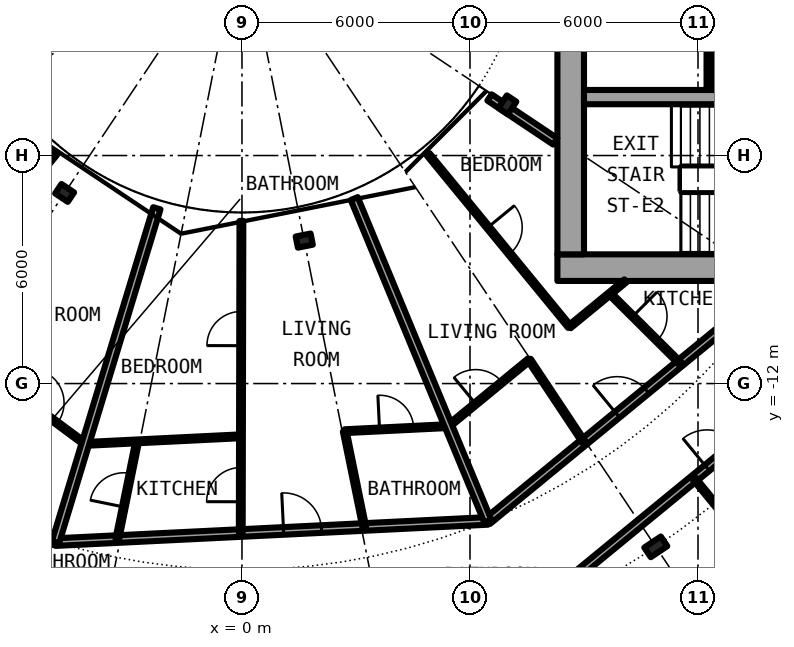
"""IFC4 building model, lengths in metres.
Left out: names, types, materials, properties, quantities, classifications, styles, units other than length and angle.
Written with IfcOpenShell. Run it as: python <this file> out.ifc"""

import sys

from ifc_helpers import new_model, si_unit, direction, frame, frame_2d, origin, origin_2d, place, context, subcontext, project, spatial, rectangle, i_section, extrude, element, fill, save


model = new_model("IFC4")
c1 = context("Model", 3, precision=1e-05, world=origin(), true_north=direction((0.0, 1.0)))
c2 = subcontext(c1, "Body", "Model", "MODEL_VIEW")
j1 = project(units=[si_unit("LENGTHUNIT", "METRE"), si_unit("PLANEANGLEUNIT", "RADIAN")], contexts=[c1])
p1 = place(None, origin())
s1 = spatial("IfcSite", under=j1, at=p1, CompositionType="ELEMENT")
p2 = place(p1, origin())
s2 = spatial("IfcBuilding", under=s1, at=p2, CompositionType="ELEMENT")
p3 = place(p2, frame((0.0, 0.0, 63.6)))
s3 = spatial("IfcBuildingStorey", under=s2, at=p3, CompositionType="ELEMENT", Elevation=63.6)
p4 = place(p3, frame((10.889, -16.297, 0.0), z_axis=(0.0, 0.0, 1.0), x_axis=(0.55557023302, -0.831469612303, 0.0)))
e1 = element("IfcColumn", 1, at=p4, inside=s3, PredefinedType="COLUMN", context=c2, shape_type="SweptSolid", body=[
    extrude(i_section(OverallWidth=0.306, OverallDepth=0.524, WebThickness=0.021, FlangeThickness=0.04, FilletRadius=0.027, at=origin_2d()), origin(), (0.0, 0.0, 1.0), 3.05),
])
for number, where, z_axis, x_axis in (
    (2, (-4.667, -6.984, 0.0), (0.0, 0.0, 1.0), (-0.556, -0.831, 0.0)),
    (3, (1.639, -8.239, 0.0), (0.0, 0.0, 1.0), (0.195, -0.981, 0.0)),
    (4, (6.984, -4.667, 0.0), (0.0, 0.0, 1.0), (0.831, -0.556, 0.0)),
):
    element("IfcColumn", number, at=place(p3, frame(where, z_axis=z_axis, x_axis=x_axis)), inside=s3, PredefinedType="COLUMN", context=c2, shape_type="SweptSolid", body=[
        extrude(i_section(OverallWidth=0.3, OverallDepth=0.4, WebThickness=0.013, FlangeThickness=0.024, FilletRadius=0.027, at=origin_2d()), origin(), (0.0, 0.0, 1.0), 3.05),
    ])
p5 = place(p3, frame((8.3, -8.95, 0.0), z_axis=(0.0, 0.0, 1.0), x_axis=(1.0, 0.0, 0.0)))
e5 = element("IfcWall", 5, at=p5, inside=s3, PredefinedType="SHEAR", context=c2, shape_type="SweptSolid", body=[
    extrude(rectangle(XDim=14.0, YDim=0.7, at=frame_2d((7.0, 0.0))), origin(), (0.0, 0.0, 1.0), 3.05),
])
p6 = place(p5, frame((11.575, 0.0, 0.0)))
e6 = element("IfcOpeningElement", 6, at=p6, cuts=e5, PredefinedType="OPENING", context=c2, shape_type="SweptSolid", body=[
    extrude(rectangle(XDim=1.2, YDim=2.3, at=frame_2d((0.6, 1.15))), frame((0.0, 0.36, 0.0), z_axis=(0.0, -1.0, 0.0), x_axis=(1.0, 0.0, 0.0)), (0.0, 0.0, 1.0), 0.72),
])
p7 = place(p3, frame((8.65, -8.6, 0.0), z_axis=(0.0, 0.0, 1.0), x_axis=(0.0, 1.0, 0.0)))
e7 = element("IfcWall", 7, at=p7, inside=s3, PredefinedType="SHEAR", context=c2, shape_type="SweptSolid", body=[
    extrude(rectangle(XDim=17.2, YDim=0.7, at=frame_2d((8.6, 0.0))), origin(), (0.0, 0.0, 1.0), 3.05),
])
p8 = place(p7, frame((7.4, 0.0, 0.1)))
e8 = element("IfcOpeningElement", 8, at=p8, cuts=e7, PredefinedType="OPENING", context=c2, shape_type="SweptSolid", body=[
    extrude(rectangle(XDim=2.4, YDim=2.2, at=frame_2d((1.2, 1.1))), frame((0.0, 0.36, 0.0), z_axis=(0.0, -1.0, 0.0), x_axis=(1.0, 0.0, 0.0)), (0.0, 0.0, 1.0), 0.72),
])
p9 = place(p3, frame((9.0, -4.462, 0.0), z_axis=(0.0, 0.0, 1.0), x_axis=(1.0, 0.0, 0.0)))
e9 = element("IfcWall", 9, at=p9, inside=s3, PredefinedType="SHEAR", context=c2, shape_type="SweptSolid", body=[
    extrude(rectangle(XDim=10.15, YDim=0.375, at=frame_2d((5.075, 0.0))), origin(), (0.0, 0.0, 1.0), 3.05),
])
p10 = place(p3, frame((12.3, -1.825, 0.0), z_axis=(0.0, 0.0, 1.0), x_axis=(0.0, -1.0, 0.0)))
e10 = element("IfcWall", 10, at=p10, inside=s3, PredefinedType="PARTITIONING", context=c2, shape_type="SweptSolid", body=[
    extrude(rectangle(XDim=2.45, YDim=0.15, at=frame_2d((1.225, 0.0))), origin(), (0.0, 0.0, 1.0), 2.7),
])
p11 = place(p3, frame((8.534, -20.603, 0.0), z_axis=(0.0, 0.0, 1.0), x_axis=(0.773000340237, 0.634405606843, 0.0)))
e11 = element("IfcWall", 11, at=p11, inside=s3, PredefinedType="PARTITIONING", context=c2, shape_type="SweptSolid", body=[
    extrude(rectangle(XDim=6.474, YDim=0.1, at=frame_2d((3.237, 0.0))), origin(), (0.0, 0.0, 1.0), 2.7),
])
p12 = place(p3, frame((-10.745, -16.356, 0.0), z_axis=(0.0, 0.0, 1.0), x_axis=(0.923881347896, -0.382679049609, 0.0)))
e12 = element("IfcWall", 12, at=p12, inside=s3, PredefinedType="PARTITIONING", context=c2, shape_type="SweptSolid", body=[
    extrude(rectangle(XDim=7.335, YDim=0.2, at=frame_2d((3.668, 0.0))), origin(), (0.0, 0.0, 1.0), 2.38),
])
p13 = place(p12, frame((4.124, 0.0, 0.0)))
e13 = element("IfcOpeningElement", 13, at=p13, cuts=e12, PredefinedType="OPENING", context=c2, shape_type="SweptSolid", body=[
    extrude(rectangle(XDim=1.0, YDim=2.3, at=frame_2d((0.5, 1.15))), frame((0.0, 0.11, 0.0), z_axis=(0.0, -1.0, 0.0), x_axis=(1.0, 0.0, 0.0)), (0.0, 0.0, 1.0), 0.22),
])
p14 = place(p3, frame((7.498, -18.109, 0.0), z_axis=(0.0, 0.0, 1.0), x_axis=(0.773076379635, 0.634312944256, 0.0)))
e14 = element("IfcWall", 14, at=p14, inside=s3, PredefinedType="PARTITIONING", context=c2, shape_type="SweptSolid", body=[
    extrude(rectangle(XDim=11.221, YDim=0.2, at=frame_2d((5.611, 0.0))), origin(), (0.0, 0.0, 1.0), 2.38),
])
p15 = place(p14, frame((6.132, 0.0, 0.0)))
e15 = element("IfcOpeningElement", 15, at=p15, cuts=e14, PredefinedType="OPENING", context=c2, shape_type="SweptSolid", body=[
    extrude(rectangle(XDim=1.0, YDim=2.3, at=frame_2d((0.5, 1.15))), frame((0.0, 0.11, 0.0), z_axis=(0.0, -1.0, 0.0), x_axis=(1.0, 0.0, 0.0)), (0.0, 0.0, 1.0), 0.22),
])
p16 = place(p3, frame((6.467, -15.614, 0.0), z_axis=(0.0, 0.0, 1.0), x_axis=(0.773074935257, 0.634314704605, 0.0)))
e16 = element("IfcWall", 16, at=p16, inside=s3, PredefinedType="PARTITIONING", context=c2, shape_type="SweptSolid", body=[
    extrude(rectangle(XDim=9.809, YDim=0.2, at=frame_2d((4.904, 0.0))), origin(), (0.0, 0.0, 1.0), 2.7),
])
p17 = place(p16, frame((4.407, 0.0, 0.0)))
e17 = element("IfcOpeningElement", 17, at=p17, cuts=e16, PredefinedType="OPENING", context=c2, shape_type="SweptSolid", body=[
    extrude(rectangle(XDim=1.0, YDim=2.3, at=frame_2d((0.5, 1.15))), frame((0.0, 0.11, 0.0), z_axis=(0.0, -1.0, 0.0), x_axis=(1.0, 0.0, 0.0)), (0.0, 0.0, 1.0), 0.22),
])
p18 = place(p3, frame((-12.745, -10.358, 0.0), z_axis=(0.0, 0.0, 1.0), x_axis=(0.803191461888, -0.595720971219, 0.0)))
e18 = element("IfcWall", 18, at=p18, inside=s3, PredefinedType="PARTITIONING", context=c2, shape_type="SweptSolid", body=[
    extrude(rectangle(XDim=9.76, YDim=0.2, at=frame_2d((4.88, 0.0))), origin(), (0.0, 0.0, 1.0), 2.7),
])
p19 = place(p18, frame((4.38, 0.0, 0.0)))
e19 = element("IfcOpeningElement", 19, at=p19, cuts=e18, PredefinedType="OPENING", context=c2, shape_type="SweptSolid", body=[
    extrude(rectangle(XDim=1.0, YDim=2.3, at=frame_2d((0.5, 1.15))), frame((0.0, 0.11, 0.0), z_axis=(0.0, -1.0, 0.0), x_axis=(1.0, 0.0, 0.0)), (0.0, 0.0, 1.0), 0.22),
])
p20 = place(p3, frame((-4.909, -16.172, 0.0), z_axis=(0.0, 0.0, 1.0), x_axis=(0.99879913765, 0.048992679355, 0.0)))
e20 = element("IfcWall", 20, at=p20, inside=s3, PredefinedType="PARTITIONING", context=c2, shape_type="SweptSolid", body=[
    extrude(rectangle(XDim=11.392, YDim=0.2, at=frame_2d((5.696, 0.0))), origin(), (0.0, 0.0, 1.0), 2.7),
])
p21 = place(p20, frame((6.011, 0.0, 0.0)))
e21 = element("IfcOpeningElement", 21, at=p21, cuts=e20, PredefinedType="OPENING", context=c2, shape_type="SweptSolid", body=[
    extrude(rectangle(XDim=1.0, YDim=2.3, at=frame_2d((0.5, 1.15))), frame((0.0, 0.11, 0.0), z_axis=(0.0, -1.0, 0.0), x_axis=(1.0, 0.0, 0.0)), (0.0, 0.0, 1.0), 0.22),
])
p22 = place(p3, frame((5.434, -13.119, 0.0), z_axis=(0.0, 0.0, 1.0), x_axis=(0.773049907698, 0.634345205868, 0.0)))
e22 = element("IfcWall", 22, at=p22, inside=s3, PredefinedType="PARTITIONING", context=c2, shape_type="SweptSolid", body=[
    extrude(rectangle(XDim=2.748, YDim=0.1, at=frame_2d((1.374, 0.0))), origin(), (0.0, 0.0, 1.0), 2.7),
])
p23 = place(p22, frame((0.924, 0.0, 0.0)))
e23 = element("IfcOpeningElement", 23, at=p23, cuts=e22, PredefinedType="OPENING", context=c2, shape_type="SweptSolid", body=[
    extrude(rectangle(XDim=0.9, YDim=2.3, at=frame_2d((0.45, 1.15))), frame((0.0, 0.06, 0.0), z_axis=(0.0, -1.0, 0.0), x_axis=(1.0, 0.0, 0.0)), (0.0, 0.0, 1.0), 0.12),
])
p24 = place(p3, frame((8.62, -10.505, 0.0), z_axis=(0.0, 0.0, 1.0), x_axis=(0.772957368531, 0.6344579627, 0.0)))
e24 = element("IfcWall", 24, at=p24, inside=s3, PredefinedType="PARTITIONING", context=c2, shape_type="SweptSolid", body=[
    extrude(rectangle(XDim=1.906, YDim=0.1, at=frame_2d((0.953, 0.0))), origin(), (0.0, 0.0, 1.0), 2.7),
])
p25 = place(p3, frame((-6.319, -11.96, 0.0), z_axis=(0.0, 0.0, 1.0), x_axis=(0.803128348509, -0.595806055542, 0.0)))
e25 = element("IfcWall", 25, at=p25, inside=s3, PredefinedType="PARTITIONING", context=c2, shape_type="SweptSolid", body=[
    extrude(rectangle(XDim=2.734, YDim=0.1, at=frame_2d((1.367, 0.0))), origin(), (0.0, 0.0, 1.0), 2.7),
])
p26 = place(p25, frame((0.918, 0.0, 0.0)))
e26 = element("IfcOpeningElement", 26, at=p26, cuts=e25, PredefinedType="OPENING", context=c2, shape_type="SweptSolid", body=[
    extrude(rectangle(XDim=0.9, YDim=2.3, at=frame_2d((0.45, 1.15))), frame((0.0, 0.06, 0.0), z_axis=(0.0, -1.0, 0.0), x_axis=(1.0, 0.0, 0.0)), (0.0, 0.0, 1.0), 0.12),
])
p27 = place(p3, frame((-4.132, -13.589, 0.0), z_axis=(0.0, 0.0, 1.0), x_axis=(0.998789681748, 0.049185075323, 0.0)))
e27 = element("IfcWall", 27, at=p27, inside=s3, PredefinedType="PARTITIONING", context=c2, shape_type="SweptSolid", body=[
    extrude(rectangle(XDim=4.11, YDim=0.1, at=frame_2d((2.055, 0.0))), origin(), (0.0, 0.0, 1.0), 2.7),
])
p28 = place(p3, frame((2.704, -13.253, 0.0), z_axis=(0.0, 0.0, 1.0), x_axis=(0.998796928508, 0.049037695739, 0.0)))
e28 = element("IfcWall", 28, at=p28, inside=s3, PredefinedType="PARTITIONING", context=c2, shape_type="SweptSolid", body=[
    extrude(rectangle(XDim=2.733, YDim=0.1, at=frame_2d((1.367, 0.0))), origin(), (0.0, 0.0, 1.0), 2.7),
])
p29 = place(p28, frame((0.917, 0.0, 0.0)))
e29 = element("IfcOpeningElement", 29, at=p29, cuts=e28, PredefinedType="OPENING", context=c2, shape_type="SweptSolid", body=[
    extrude(rectangle(XDim=0.9, YDim=2.3, at=frame_2d((0.45, 1.15))), frame((0.0, 0.06, 0.0), z_axis=(0.0, -1.0, 0.0), x_axis=(1.0, 0.0, 0.0)), (0.0, 0.0, 1.0), 0.12),
])
p30 = place(p3, frame((6.513, -4.472, 0.0), z_axis=(0.0, 0.0, 1.0), x_axis=(0.831382204863, -0.555701025225, 0.0)))
e30 = element("IfcWall", 30, at=p30, inside=s3, PredefinedType="PARTITIONING", context=c2, shape_type="SweptSolid", body=[
    extrude(rectangle(XDim=2.082, YDim=0.2, at=frame_2d((1.041, 0.0))), origin(), (0.0, 0.0, 1.0), 2.7),
])
p31 = place(p3, frame((-10.132, -12.296, 0.0), z_axis=(0.0, 0.0, 1.0), x_axis=(0.636105207978, 0.771602335652, 0.0)))
e31 = element("IfcWall", 31, at=p31, inside=s3, PredefinedType="PARTITIONING", context=c2, shape_type="SweptSolid", body=[
    extrude(rectangle(XDim=8.213, YDim=0.1, at=frame_2d((4.106, 0.0))), origin(), (0.0, 0.0, 1.0), 2.7),
])
p32 = place(p31, frame((0.821, 0.0, 0.0)))
e32 = element("IfcOpeningElement", 32, at=p32, cuts=e31, PredefinedType="OPENING", context=c2, shape_type="SweptSolid", body=[
    extrude(rectangle(XDim=0.9, YDim=2.3, at=frame_2d((0.45, 1.15))), frame((0.0, 0.06, 0.0), z_axis=(0.0, -1.0, 0.0), x_axis=(1.0, 0.0, 0.0)), (0.0, 0.0, 1.0), 0.12),
])
p33 = place(p31, frame((4.929, 0.0, 0.0)))
e33 = element("IfcOpeningElement", 33, at=p33, cuts=e31, PredefinedType="OPENING", context=c2, shape_type="SweptSolid", body=[
    extrude(rectangle(XDim=0.9, YDim=2.3, at=frame_2d((0.45, 1.15))), frame((0.0, 0.06, 0.0), z_axis=(0.0, -1.0, 0.0), x_axis=(1.0, 0.0, 0.0)), (0.0, 0.0, 1.0), 0.12),
])
p34 = place(p3, frame((-4.906, -16.172, 0.0), z_axis=(0.0, 0.0, 1.0), x_axis=(0.290420725025, 0.956899055531, 0.0)))
e34 = element("IfcWall", 34, at=p34, inside=s3, PredefinedType="PARTITIONING", context=c2, shape_type="SweptSolid", body=[
    extrude(rectangle(XDim=9.18, YDim=0.2, at=frame_2d((4.59, 0.0))), origin(), (0.0, 0.0, 1.0), 2.7),
])
p35 = place(p3, frame((-3.281, -16.092, 0.0), z_axis=(0.0, 0.0, 1.0), x_axis=(0.199675621436, 0.979862054681, 0.0)))
e35 = element("IfcWall", 35, at=p35, inside=s3, PredefinedType="PARTITIONING", context=c2, shape_type="SweptSolid", body=[
    extrude(rectangle(XDim=2.624, YDim=0.1, at=frame_2d((1.312, 0.0))), origin(), (0.0, 0.0, 1.0), 2.7),
])
p36 = place(p35, frame((0.862, 0.0, 0.0)))
e36 = element("IfcOpeningElement", 36, at=p36, cuts=e35, PredefinedType="OPENING", context=c2, shape_type="SweptSolid", body=[
    extrude(rectangle(XDim=0.9, YDim=2.3, at=frame_2d((0.45, 1.15))), frame((0.0, 0.06, 0.0), z_axis=(0.0, -1.0, 0.0), x_axis=(1.0, 0.0, 0.0)), (0.0, 0.0, 1.0), 0.12),
])
p37 = place(p3, frame((-0.032, -15.933, 0.0), z_axis=(0.0, 0.0, 1.0), x_axis=(0.002080789764, 0.999997835155, 0.0)))
e37 = element("IfcWall", 37, at=p37, inside=s3, PredefinedType="PARTITIONING", context=c2, shape_type="SweptSolid", body=[
    extrude(rectangle(XDim=8.213, YDim=0.1, at=frame_2d((4.106, 0.0))), origin(), (0.0, 0.0, 1.0), 2.7),
])
p38 = place(p37, frame((0.823, 0.0, 0.0)))
e38 = element("IfcOpeningElement", 38, at=p38, cuts=e37, PredefinedType="OPENING", context=c2, shape_type="SweptSolid", body=[
    extrude(rectangle(XDim=0.9, YDim=2.3, at=frame_2d((0.45, 1.15))), frame((0.0, 0.06, 0.0), z_axis=(0.0, -1.0, 0.0), x_axis=(1.0, 0.0, 0.0)), (0.0, 0.0, 1.0), 0.12),
])
p39 = place(p37, frame((4.93, 0.0, 0.0)))
e39 = element("IfcOpeningElement", 39, at=p39, cuts=e37, PredefinedType="OPENING", context=c2, shape_type="SweptSolid", body=[
    extrude(rectangle(XDim=0.9, YDim=2.3, at=frame_2d((0.45, 1.15))), frame((0.0, 0.06, 0.0), z_axis=(0.0, -1.0, 0.0), x_axis=(1.0, 0.0, 0.0)), (0.0, 0.0, 1.0), 0.12),
])
p40 = place(p3, frame((2.704, -13.253, 0.0), z_axis=(0.0, 0.0, 1.0), x_axis=(0.199820523641, -0.979832515449, 0.0)))
e40 = element("IfcWall", 40, at=p40, inside=s3, PredefinedType="PARTITIONING", context=c2, shape_type="SweptSolid", body=[
    extrude(rectangle(XDim=2.572, YDim=0.1, at=frame_2d((1.286, 0.0))), origin(), (0.0, 0.0, 1.0), 2.7),
])
p41 = place(p3, frame((2.954, -7.132, 0.0), z_axis=(0.0, 0.0, 1.0), x_axis=(0.382646942224, -0.923894646378, 0.0)))
e41 = element("IfcWall", 41, at=p41, inside=s3, PredefinedType="PARTITIONING", context=c2, shape_type="SweptSolid", body=[
    extrude(rectangle(XDim=9.181, YDim=0.2, at=frame_2d((4.59, 0.0))), origin(), (0.0, 0.0, 1.0), 2.7),
])
p42 = place(p3, frame((4.898, -5.968, 0.0), z_axis=(0.0, 0.0, 1.0), x_axis=(0.634358693064, -0.773038840249, 0.0)))
e42 = element("IfcWall", 42, at=p42, inside=s3, PredefinedType="PARTITIONING", context=c2, shape_type="SweptSolid", body=[
    extrude(rectangle(XDim=5.868, YDim=0.1, at=frame_2d((2.934, 0.0))), origin(), (0.0, 0.0, 1.0), 2.7),
])
p43 = place(p42, frame((2.484, 0.0, 0.0)))
e43 = element("IfcOpeningElement", 43, at=p43, cuts=e42, PredefinedType="OPENING", context=c2, shape_type="SweptSolid", body=[
    extrude(rectangle(XDim=0.9, YDim=2.3, at=frame_2d((0.45, 1.15))), frame((0.0, 0.06, 0.0), z_axis=(0.0, -1.0, 0.0), x_axis=(1.0, 0.0, 0.0)), (0.0, 0.0, 1.0), 0.12),
])
p44 = place(p3, frame((7.558, -11.376, 0.0), z_axis=(0.0, 0.0, 1.0), x_axis=(0.553615197403, -0.83277260594, 0.0)))
e44 = element("IfcWall", 44, at=p44, inside=s3, PredefinedType="PARTITIONING", context=c2, shape_type="SweptSolid", body=[
    extrude(rectangle(XDim=2.597, YDim=0.1, at=frame_2d((1.299, 0.0))), origin(), (0.0, 0.0, 1.0), 2.7),
])
p45 = place(p3, frame((9.683, -9.632, 0.0), z_axis=(0.0, 0.0, 1.0), x_axis=(0.708796844581, -0.705412668665, 0.0)))
e45 = element("IfcWall", 45, at=p45, inside=s3, PredefinedType="PARTITIONING", context=c2, shape_type="SweptSolid", body=[
    extrude(rectangle(XDim=2.597, YDim=0.1, at=frame_2d((1.299, 0.0))), origin(), (0.0, 0.0, 1.0), 2.7),
])
p46 = place(p45, frame((0.849, 0.0, 0.0)))
e46 = element("IfcOpeningElement", 46, at=p46, cuts=e45, PredefinedType="OPENING", context=c2, shape_type="SweptSolid", body=[
    extrude(rectangle(XDim=0.9, YDim=2.3, at=frame_2d((0.45, 1.15))), frame((0.0, 0.06, 0.0), z_axis=(0.0, -1.0, 0.0), x_axis=(1.0, 0.0, 0.0)), (0.0, 0.0, 1.0), 0.12),
])
p47 = place(p3, frame((11.899, -14.499, 0.0), z_axis=(0.0, 0.0, 1.0), x_axis=(0.634396151441, -0.77300810024, 0.0)))
e47 = element("IfcWall", 47, at=p47, inside=s3, PredefinedType="PARTITIONING", context=c2, shape_type="SweptSolid", body=[
    extrude(rectangle(XDim=8.419, YDim=0.1, at=frame_2d((4.209, 0.0))), origin(), (0.0, 0.0, 1.0), 2.7),
])
p48 = place(p47, frame((0.842, 0.0, 0.0)))
e48 = element("IfcOpeningElement", 48, at=p48, cuts=e47, PredefinedType="OPENING", context=c2, shape_type="SweptSolid", body=[
    extrude(rectangle(XDim=0.9, YDim=2.3, at=frame_2d((0.45, 1.15))), frame((0.0, 0.06, 0.0), z_axis=(0.0, -1.0, 0.0), x_axis=(1.0, 0.0, 0.0)), (0.0, 0.0, 1.0), 0.12),
])
p49 = place(p47, frame((5.051, 0.0, 0.0)))
e49 = element("IfcOpeningElement", 49, at=p49, cuts=e47, PredefinedType="OPENING", context=c2, shape_type="SweptSolid", body=[
    extrude(rectangle(XDim=0.9, YDim=2.3, at=frame_2d((0.45, 1.15))), frame((0.0, 0.06, 0.0), z_axis=(0.0, -1.0, 0.0), x_axis=(1.0, 0.0, 0.0)), (0.0, 0.0, 1.0), 0.12),
])
p50 = place(p15, origin())
e50 = element("IfcDoor", 50, at=p50, inside=s3, OperationType="SINGLE_SWING_RIGHT", PredefinedType="DOOR", context=c2, shape_type="SweptSolid", body=[
    extrude(rectangle(XDim=1.0, YDim=2.3, at=frame_2d((0.5, 1.15))), frame((0.0, 0.025, 0.0), z_axis=(0.0, -1.0, 0.0), x_axis=(1.0, 0.0, 0.0)), (0.0, 0.0, 1.0), 0.05),
])
fill(e15, e50)
p51 = place(p48, origin())
e51 = element("IfcDoor", 51, at=p51, inside=s3, OperationType="SINGLE_SWING_LEFT", PredefinedType="DOOR", context=c2, shape_type="SweptSolid", body=[
    extrude(rectangle(XDim=0.9, YDim=2.3, at=frame_2d((0.45, 1.15))), frame((0.0, 0.025, 0.0), z_axis=(0.0, -1.0, 0.0), x_axis=(1.0, 0.0, 0.0)), (0.0, 0.0, 1.0), 0.05),
])
fill(e48, e51)
p52 = place(p26, origin())
e52 = element("IfcDoor", 52, at=p52, inside=s3, OperationType="SINGLE_SWING_RIGHT", PredefinedType="DOOR", context=c2, shape_type="SweptSolid", body=[
    extrude(rectangle(XDim=0.9, YDim=2.3, at=frame_2d((0.45, 1.15))), frame((0.0, 0.025, 0.0), z_axis=(0.0, -1.0, 0.0), x_axis=(1.0, 0.0, 0.0)), (0.0, 0.0, 1.0), 0.05),
])
fill(e26, e52)
p53 = place(p21, origin())
e53 = element("IfcDoor", 53, at=p53, inside=s3, OperationType="SINGLE_SWING_RIGHT", PredefinedType="DOOR", context=c2, shape_type="SweptSolid", body=[
    extrude(rectangle(XDim=1.0, YDim=2.3, at=frame_2d((0.5, 1.15))), frame((0.0, 0.025, 0.0), z_axis=(0.0, -1.0, 0.0), x_axis=(1.0, 0.0, 0.0)), (0.0, 0.0, 1.0), 0.05),
])
fill(e21, e53)
p54 = place(p29, origin())
e54 = element("IfcDoor", 54, at=p54, inside=s3, OperationType="SINGLE_SWING_RIGHT", PredefinedType="DOOR", context=c2, shape_type="SweptSolid", body=[
    extrude(rectangle(XDim=0.9, YDim=2.3, at=frame_2d((0.45, 1.15))), frame((0.0, 0.025, 0.0), z_axis=(0.0, -1.0, 0.0), x_axis=(1.0, 0.0, 0.0)), (0.0, 0.0, 1.0), 0.05),
])
fill(e29, e54)
p55 = place(p38, origin())
e55 = element("IfcDoor", 55, at=p55, inside=s3, OperationType="SINGLE_SWING_LEFT", PredefinedType="DOOR", context=c2, shape_type="SweptSolid", body=[
    extrude(rectangle(XDim=0.9, YDim=2.3, at=frame_2d((0.45, 1.15))), frame((0.0, 0.025, 0.0), z_axis=(0.0, -1.0, 0.0), x_axis=(1.0, 0.0, 0.0)), (0.0, 0.0, 1.0), 0.05),
])
fill(e38, e55)
p56 = place(p36, origin())
e56 = element("IfcDoor", 56, at=p56, inside=s3, OperationType="SINGLE_SWING_LEFT", PredefinedType="DOOR", context=c2, shape_type="SweptSolid", body=[
    extrude(rectangle(XDim=0.9, YDim=2.3, at=frame_2d((0.45, 1.15))), frame((0.0, 0.025, 0.0), z_axis=(0.0, -1.0, 0.0), x_axis=(1.0, 0.0, 0.0)), (0.0, 0.0, 1.0), 0.05),
])
fill(e36, e56)
p57 = place(p39, origin())
e57 = element("IfcDoor", 57, at=p57, inside=s3, OperationType="SINGLE_SWING_RIGHT", PredefinedType="DOOR", context=c2, shape_type="SweptSolid", body=[
    extrude(rectangle(XDim=0.9, YDim=2.3, at=frame_2d((0.45, 1.15))), frame((0.0, 0.025, 0.0), z_axis=(0.0, -1.0, 0.0), x_axis=(1.0, 0.0, 0.0)), (0.0, 0.0, 1.0), 0.05),
])
fill(e39, e57)
p58 = place(p17, origin())
e58 = element("IfcDoor", 58, at=p58, inside=s3, OperationType="SINGLE_SWING_RIGHT", PredefinedType="DOOR", context=c2, shape_type="SweptSolid", body=[
    extrude(rectangle(XDim=1.0, YDim=2.3, at=frame_2d((0.5, 1.15))), frame((0.0, 0.025, 0.0), z_axis=(0.0, -1.0, 0.0), x_axis=(1.0, 0.0, 0.0)), (0.0, 0.0, 1.0), 0.05),
])
fill(e17, e58)
p59 = place(p23, origin())
e59 = element("IfcDoor", 59, at=p59, inside=s3, OperationType="SINGLE_SWING_RIGHT", PredefinedType="DOOR", context=c2, shape_type="SweptSolid", body=[
    extrude(rectangle(XDim=0.9, YDim=2.3, at=frame_2d((0.45, 1.15))), frame((0.0, 0.025, 0.0), z_axis=(0.0, -1.0, 0.0), x_axis=(1.0, 0.0, 0.0)), (0.0, 0.0, 1.0), 0.05),
])
fill(e23, e59)
p60 = place(p46, origin())
e60 = element("IfcDoor", 60, at=p60, inside=s3, OperationType="SINGLE_SWING_RIGHT", PredefinedType="DOOR", context=c2, shape_type="SweptSolid", body=[
    extrude(rectangle(XDim=0.9, YDim=2.3, at=frame_2d((0.45, 1.15))), frame((0.0, 0.025, 0.0), z_axis=(0.0, -1.0, 0.0), x_axis=(1.0, 0.0, 0.0)), (0.0, 0.0, 1.0), 0.05),
])
fill(e46, e60)
p61 = place(p43, origin())
e61 = element("IfcDoor", 61, at=p61, inside=s3, OperationType="SINGLE_SWING_LEFT", PredefinedType="DOOR", context=c2, shape_type="SweptSolid", body=[
    extrude(rectangle(XDim=0.9, YDim=2.3, at=frame_2d((0.45, 1.15))), frame((0.0, 0.025, 0.0), z_axis=(0.0, -1.0, 0.0), x_axis=(1.0, 0.0, 0.0)), (0.0, 0.0, 1.0), 0.05),
])
fill(e43, e61)
save(model, sys.argv[1])
